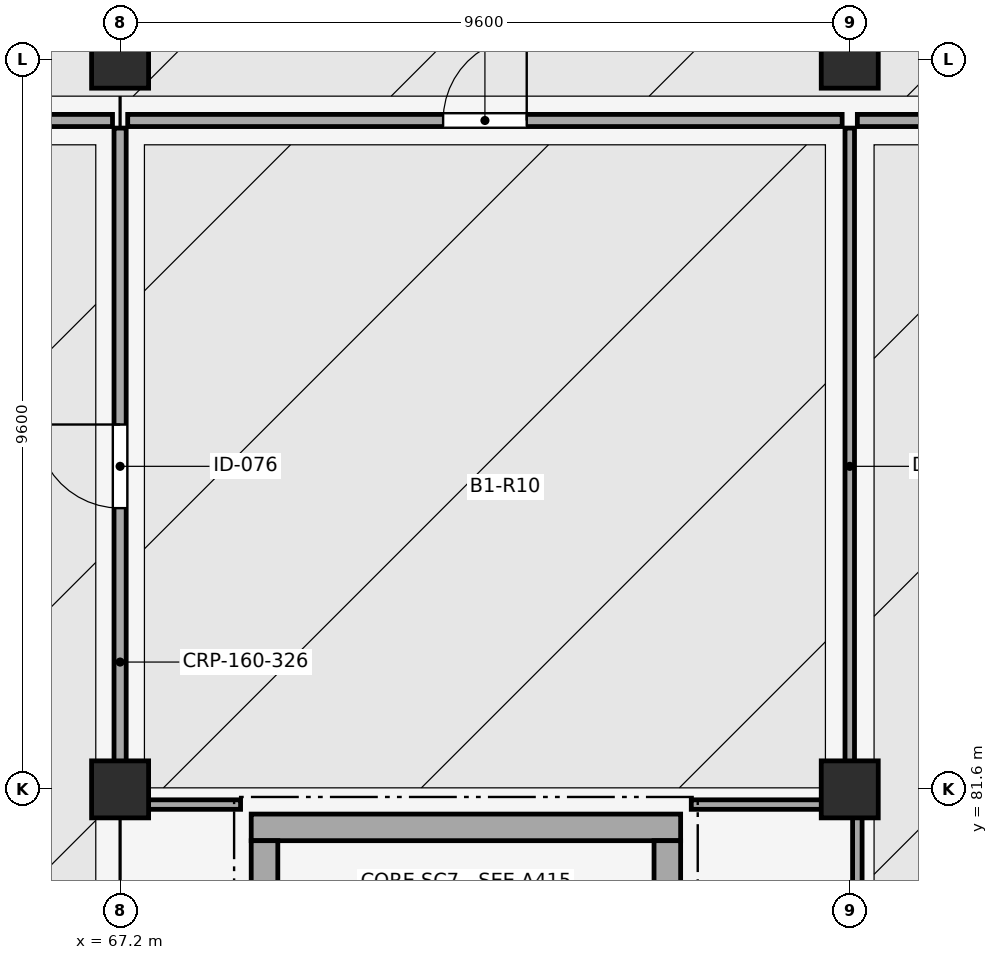
"""IFC4 building model, lengths in metres.
Left out: names, types, materials, properties, quantities, classifications, styles, units other than length and angle.
Written with IfcOpenShell. Run it as: python <this file> out.ifc"""

import sys

from ifc_helpers import new_model, si_unit, direction, frame, frame_2d, origin, origin_2d, place, context, subcontext, project, spatial, rectangle, extrude, element, fill, save


model = new_model("IFC4")
c1 = context("Model", 3, precision=1e-05, world=origin(), true_north=direction((0.0, 1.0)))
c2 = subcontext(c1, "Body", "Model", "MODEL_VIEW")
j1 = project(units=[si_unit("LENGTHUNIT", "METRE"), si_unit("PLANEANGLEUNIT", "RADIAN")], contexts=[c1])
p1 = place(None, origin())
s1 = spatial("IfcSite", under=j1, at=p1, CompositionType="ELEMENT")
p2 = place(p1, origin())
s2 = spatial("IfcBuilding", under=s1, at=p2, CompositionType="ELEMENT")
p3 = place(p2, frame((0.0, 0.0, -4.2)))
s3 = spatial("IfcBuildingStorey", under=s2, at=p3, CompositionType="ELEMENT", Elevation=-4.2)
for number, where, z_axis, x_axis in (
    (1, (67.2, 81.6, 0.0), (0.0, 0.0, 1.0), (1.0, 0.0, 0.0)),
    (2, (67.2, 91.2, 0.0), (0.0, 0.0, 1.0), (1.0, 0.0, 0.0)),
    (3, (76.8, 81.6, 0.0), (0.0, 0.0, 1.0), (1.0, 0.0, 0.0)),
    (4, (76.8, 91.2, 0.0), (0.0, 0.0, 1.0), (1.0, 0.0, 0.0)),
):
    element("IfcColumn", number, at=place(p3, frame(where, z_axis=z_axis, x_axis=x_axis)), inside=s3, PredefinedType="COLUMN", context=c2, shape_type="SweptSolid", body=[
        extrude(rectangle(XDim=0.75, YDim=0.75, at=origin_2d()), origin(), (0.0, 0.0, 1.0), 4.2),
    ])
p4 = place(p3, frame((68.925, 81.1, 0.0), z_axis=(0.0, 0.0, 1.0), x_axis=(1.0, 0.0, 0.0)))
e5 = element("IfcWall", 5, at=p4, inside=s3, PredefinedType="SHEAR", context=c2, shape_type="SweptSolid", body=[
    extrude(rectangle(XDim=5.65, YDim=0.35, at=frame_2d((2.825, 0.0))), origin(), (0.0, 0.0, 1.0), 3.95),
])
p5 = place(p3, frame((69.1, 72.975, 0.0), z_axis=(0.0, 0.0, 1.0), x_axis=(0.0, 1.0, 0.0)))
e6 = element("IfcWall", 6, at=p5, inside=s3, PredefinedType="SHEAR", context=c2, shape_type="SweptSolid", body=[
    extrude(rectangle(XDim=7.95, YDim=0.35, at=frame_2d((3.975, 0.0))), origin(), (0.0, 0.0, 1.0), 3.95),
])
p6 = place(p3, frame((74.4, 80.925, 0.0), z_axis=(0.0, 0.0, 1.0), x_axis=(0.0, -1.0, 0.0)))
e7 = element("IfcWall", 7, at=p6, inside=s3, PredefinedType="SHEAR", context=c2, shape_type="SweptSolid", body=[
    extrude(rectangle(XDim=7.95, YDim=0.35, at=frame_2d((3.975, 0.0))), origin(), (0.0, 0.0, 1.0), 3.95),
])
p7 = place(p6, frame((5.68, 0.0, 0.0)))
e8 = element("IfcOpeningElement", 8, at=p7, cuts=e7, PredefinedType="OPENING", context=c2, shape_type="SweptSolid", body=[
    extrude(rectangle(XDim=2.05, YDim=2.15, at=frame_2d((1.025, 1.075))), frame((0.0, 0.185, 0.0), z_axis=(0.0, -1.0, 0.0), x_axis=(1.0, 0.0, 0.0)), (0.0, 0.0, 1.0), 0.37),
])
p8 = place(p3, frame((67.2, 81.4, 0.0), z_axis=(0.0, 0.0, 1.0), x_axis=(0.0, 1.0, 0.0)))
e9 = element("IfcWall", 9, at=p8, inside=s3, PredefinedType="PARTITIONING", context=c2, shape_type="SweptSolid", body=[
    extrude(rectangle(XDim=8.9, YDim=0.16, at=frame_2d((4.45, 0.0))), origin(), (0.0, 0.0, 1.0), 3.255),
])
p9 = place(p8, frame((3.9, 0.0, 0.0)))
e10 = element("IfcOpeningElement", 10, at=p9, cuts=e9, PredefinedType="OPENING", context=c2, shape_type="SweptSolid", body=[
    extrude(rectangle(XDim=1.1, YDim=2.18, at=frame_2d((0.55, 1.09))), frame((0.0, 0.09, 0.0), z_axis=(0.0, -1.0, 0.0), x_axis=(1.0, 0.0, 0.0)), (0.0, 0.0, 1.0), 0.18),
])
p10 = place(p3, frame((55.8, 90.4, 0.0), z_axis=(0.0, 0.0, 1.0), x_axis=(1.0, 0.0, 0.0)))
e11 = element("IfcWall", 11, at=p10, inside=s3, PredefinedType="PARTITIONING", context=c2, shape_type="SweptSolid", body=[
    extrude(rectangle(XDim=11.3, YDim=0.16, at=frame_2d((5.65, 0.0))), origin(), (0.0, 0.0, 1.0), 3.84),
])
p11 = place(p10, frame((4.75, 0.0, 0.0)))
e12 = element("IfcOpeningElement", 12, at=p11, cuts=e11, PredefinedType="OPENING", context=c2, shape_type="SweptSolid", body=[
    extrude(rectangle(XDim=1.8, YDim=2.15, at=frame_2d((0.9, 1.075))), frame((0.0, 0.09, 0.0), z_axis=(0.0, -1.0, 0.0), x_axis=(1.0, 0.0, 0.0)), (0.0, 0.0, 1.0), 0.18),
])
p12 = place(p3, frame((76.8, 81.4, 0.0), z_axis=(0.0, 0.0, 1.0), x_axis=(0.0, 1.0, 0.0)))
e13 = element("IfcWall", 13, at=p12, inside=s3, PredefinedType="PARTITIONING", context=c2, shape_type="SweptSolid", body=[
    extrude(rectangle(XDim=8.9, YDim=0.125, at=frame_2d((4.45, 0.0))), origin(), (0.0, 0.0, 1.0), 3.295),
])
p13 = place(p3, frame((67.3, 90.4, 0.0), z_axis=(0.0, 0.0, 1.0), x_axis=(1.0, 0.0, 0.0)))
e14 = element("IfcWall", 14, at=p13, inside=s3, PredefinedType="PARTITIONING", context=c2, shape_type="SweptSolid", body=[
    extrude(rectangle(XDim=9.4, YDim=0.16, at=frame_2d((4.7, 0.0))), origin(), (0.0, 0.0, 1.0), 3.84),
])
p14 = place(p13, frame((4.15, 0.0, 0.0)))
e15 = element("IfcOpeningElement", 15, at=p14, cuts=e14, PredefinedType="OPENING", context=c2, shape_type="SweptSolid", body=[
    extrude(rectangle(XDim=1.1, YDim=2.18, at=frame_2d((0.55, 1.09))), frame((0.0, 0.09, 0.0), z_axis=(0.0, -1.0, 0.0), x_axis=(1.0, 0.0, 0.0)), (0.0, 0.0, 1.0), 0.18),
])
p15 = place(p3, frame((76.9, 90.4, 0.0), z_axis=(0.0, 0.0, 1.0), x_axis=(1.0, 0.0, 0.0)))
e16 = element("IfcWall", 16, at=p15, inside=s3, PredefinedType="PARTITIONING", context=c2, shape_type="SweptSolid", body=[
    extrude(rectangle(XDim=19.05, YDim=0.16, at=frame_2d((9.525, 0.0))), origin(), (0.0, 0.0, 1.0), 3.84),
])
p16 = place(p15, frame((6.391, 0.0, 0.0)))
e17 = element("IfcOpeningElement", 17, at=p16, cuts=e16, PredefinedType="OPENING", context=c2, shape_type="SweptSolid", body=[
    extrude(rectangle(XDim=1.1, YDim=2.18, at=frame_2d((0.55, 1.09))), frame((0.0, 0.09, 0.0), z_axis=(0.0, -1.0, 0.0), x_axis=(1.0, 0.0, 0.0)), (0.0, 0.0, 1.0), 0.18),
])
p17 = place(p3, frame((67.44, 81.4, 0.0), z_axis=(0.0, 0.0, 1.0), x_axis=(1.0, 0.0, 0.0)))
e18 = element("IfcWall", 18, at=p17, inside=s3, PredefinedType="PARTITIONING", context=c2, shape_type="SweptSolid", body=[
    extrude(rectangle(XDim=1.345, YDim=0.125, at=frame_2d((0.672, 0.0))), origin(), (0.0, 0.0, 1.0), 3.252),
])
p18 = place(p3, frame((74.715, 81.4, 0.0), z_axis=(0.0, 0.0, 1.0), x_axis=(1.0, 0.0, 0.0)))
e19 = element("IfcWall", 19, at=p18, inside=s3, PredefinedType="PARTITIONING", context=c2, shape_type="SweptSolid", body=[
    extrude(rectangle(XDim=1.845, YDim=0.125, at=frame_2d((0.922, 0.0))), origin(), (0.0, 0.0, 1.0), 3.252),
])
p19 = place(p3, frame((76.9, 72.05, 0.0), z_axis=(0.0, 0.0, 1.0), x_axis=(0.0, 1.0, 0.0)))
e20 = element("IfcWall", 20, at=p19, inside=s3, PredefinedType="PARTITIONING", context=c2, shape_type="SweptSolid", body=[
    extrude(rectangle(XDim=9.21, YDim=0.125, at=frame_2d((4.605, 0.0))), origin(), (0.0, 0.0, 1.0), 3.275),
])
p20 = place(p9, origin())
e21 = element("IfcDoor", 21, at=p20, inside=s3, OperationType="SINGLE_SWING_RIGHT", PredefinedType="DOOR", context=c2, shape_type="SweptSolid", body=[
    extrude(rectangle(XDim=1.1, YDim=2.18, at=frame_2d((0.55, 1.09))), frame((0.0, 0.025, 0.0), z_axis=(0.0, -1.0, 0.0), x_axis=(1.0, 0.0, 0.0)), (0.0, 0.0, 1.0), 0.05),
])
fill(e10, e21)
p21 = place(p14, origin())
e22 = element("IfcDoor", 22, at=p21, inside=s3, OperationType="SINGLE_SWING_RIGHT", PredefinedType="DOOR", context=c2, shape_type="SweptSolid", body=[
    extrude(rectangle(XDim=1.1, YDim=2.18, at=frame_2d((0.55, 1.09))), frame((0.0, 0.025, 0.0), z_axis=(0.0, -1.0, 0.0), x_axis=(1.0, 0.0, 0.0)), (0.0, 0.0, 1.0), 0.05),
])
fill(e15, e22)
save(model, sys.argv[1])
